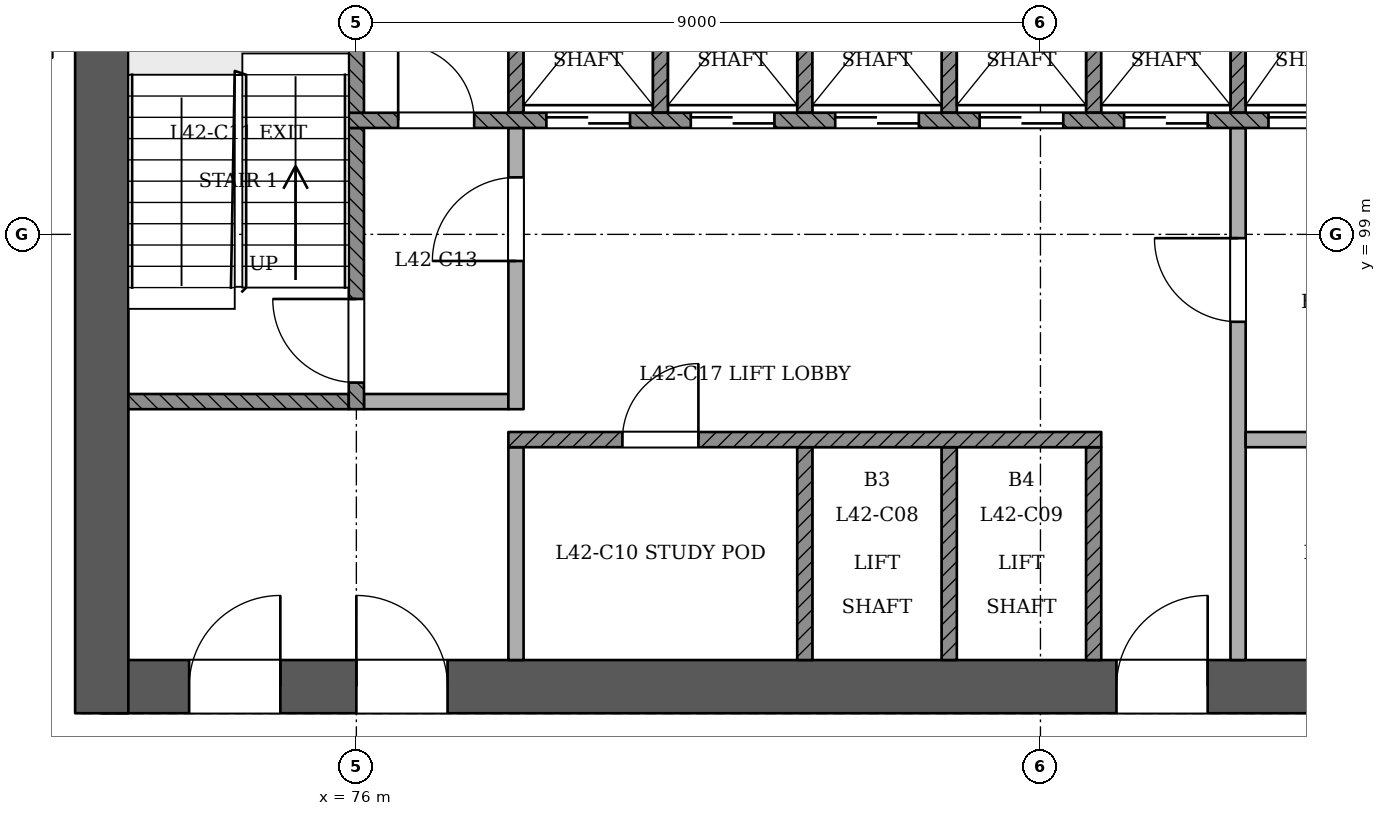
"""IFC4 building model, lengths in metres.
Left out: names, types, materials, properties, quantities, classifications, styles, units other than length and angle.
Written with IfcOpenShell. Run it as: python <this file> out.ifc"""

import sys

from ifc_helpers import new_model, si_unit, direction, frame, frame_2d, origin, place, context, subcontext, project, spatial, rectangle, extrude, element, fill, save


model = new_model("IFC4")
c1 = context("Model", 3, precision=1e-05, world=origin(), true_north=direction((0.0, 1.0)))
c2 = subcontext(c1, "Body", "Model", "MODEL_VIEW")
j1 = project(units=[si_unit("LENGTHUNIT", "METRE"), si_unit("PLANEANGLEUNIT", "RADIAN")], contexts=[c1])
p1 = place(None, origin())
s1 = spatial("IfcSite", under=j1, at=p1, CompositionType="ELEMENT")
p2 = place(p1, origin())
s2 = spatial("IfcBuilding", under=s1, at=p2, CompositionType="ELEMENT")
p3 = place(p2, frame((0.0, 0.0, 163.8)))
s3 = spatial("IfcBuildingStorey", under=s2, at=p3, CompositionType="ELEMENT", Elevation=163.8)
p4 = place(p3, frame((72.65, 93.05, 0.0), z_axis=(0.0, 0.0, 1.0), x_axis=(1.0, 0.0, 0.0)))
e1 = element("IfcWall", 1, at=p4, inside=s3, PredefinedType="SHEAR", context=c2, shape_type="SweptSolid", body=[
    extrude(rectangle(XDim=25.05, YDim=0.7, at=frame_2d((12.525, 0.0))), origin(), (0.0, 0.0, 1.0), 3.6),
])
p5 = place(p4, frame((1.15, 0.0, 0.0)))
e2 = element("IfcOpeningElement", 2, at=p5, cuts=e1, PredefinedType="OPENING", context=c2, shape_type="SweptSolid", body=[
    extrude(rectangle(XDim=1.2, YDim=2.1, at=frame_2d((0.6, 1.05))), frame((0.0, 0.36, 0.0), z_axis=(0.0, -1.0, 0.0), x_axis=(1.0, 0.0, 0.0)), (0.0, 0.0, 1.0), 0.721),
])
p6 = place(p4, frame((3.35, 0.0, 0.0)))
e3 = element("IfcOpeningElement", 3, at=p6, cuts=e1, PredefinedType="OPENING", context=c2, shape_type="SweptSolid", body=[
    extrude(rectangle(XDim=1.2, YDim=2.1, at=frame_2d((0.6, 1.05))), frame((0.0, 0.36, 0.0), z_axis=(0.0, -1.0, 0.0), x_axis=(1.0, 0.0, 0.0)), (0.0, 0.0, 1.0), 0.721),
])
p7 = place(p4, frame((13.35, 0.0, 0.0)))
e4 = element("IfcOpeningElement", 4, at=p7, cuts=e1, PredefinedType="OPENING", context=c2, shape_type="SweptSolid", body=[
    extrude(rectangle(XDim=1.2, YDim=2.1, at=frame_2d((0.6, 1.05))), frame((0.0, 0.36, 0.0), z_axis=(0.0, -1.0, 0.0), x_axis=(1.0, 0.0, 0.0)), (0.0, 0.0, 1.0), 0.721),
])
p8 = place(p4, frame((16.762, 0.0, 0.0)))
e5 = element("IfcOpeningElement", 5, at=p8, cuts=e1, PredefinedType="OPENING", context=c2, shape_type="SweptSolid", body=[
    extrude(rectangle(XDim=1.0, YDim=2.1, at=frame_2d((0.5, 1.05))), frame((0.0, 0.36, 0.0), z_axis=(0.0, -1.0, 0.0), x_axis=(1.0, 0.0, 0.0)), (0.0, 0.0, 1.0), 0.721),
])
p9 = place(p4, frame((20.65, 0.0, 0.0)))
e6 = element("IfcOpeningElement", 6, at=p9, cuts=e1, PredefinedType="OPENING", context=c2, shape_type="SweptSolid", body=[
    extrude(rectangle(XDim=1.0, YDim=2.1, at=frame_2d((0.5, 1.05))), frame((0.0, 0.36, 0.0), z_axis=(0.0, -1.0, 0.0), x_axis=(1.0, 0.0, 0.0)), (0.0, 0.0, 1.0), 0.721),
])
p10 = place(p4, frame((23.087, 0.0, 0.0)))
e7 = element("IfcOpeningElement", 7, at=p10, cuts=e1, PredefinedType="OPENING", context=c2, shape_type="SweptSolid", body=[
    extrude(rectangle(XDim=1.0, YDim=2.1, at=frame_2d((0.5, 1.05))), frame((0.0, 0.36, 0.0), z_axis=(0.0, -1.0, 0.0), x_axis=(1.0, 0.0, 0.0)), (0.0, 0.0, 1.0), 0.721),
])
p11 = place(p3, frame((72.65, 103.75, 0.0), z_axis=(0.0, 0.0, 1.0), x_axis=(0.0, -1.0, 0.0)))
e8 = element("IfcWall", 8, at=p11, inside=s3, PredefinedType="SHEAR", context=c2, shape_type="SweptSolid", body=[
    extrude(rectangle(XDim=11.05, YDim=0.7, at=frame_2d((5.525, 0.0))), origin(), (0.0, 0.0, 1.0), 3.6),
])
p12 = place(p3, frame((78.1, 93.4, 0.0), z_axis=(0.0, 0.0, 1.0), x_axis=(0.0, 1.0, 0.0)))
e9 = element("IfcWall", 9, at=p12, inside=s3, PredefinedType="PARTITIONING", context=c2, shape_type="SweptSolid", body=[
    extrude(rectangle(XDim=2.8, YDim=0.2, at=frame_2d((1.4, 0.0))), origin(), (0.0, 0.0, 1.0), 3.15),
])
for number, where, z_axis, x_axis in (
    (10, (81.9, 93.4, 0.0), (0.0, 0.0, 1.0), (0.0, 1.0, 0.0)),
    (11, (83.8, 93.4, 0.0), (0.0, 0.0, 1.0), (0.0, 1.0, 0.0)),
    (12, (85.7, 93.4, 0.0), (0.0, 0.0, 1.0), (0.0, 1.0, 0.0)),
):
    element("IfcWall", number, at=place(p3, frame(where, z_axis=z_axis, x_axis=x_axis)), inside=s3, PredefinedType="SOLIDWALL", context=c2, shape_type="SweptSolid", body=[
        extrude(rectangle(XDim=2.8, YDim=0.2, at=frame_2d((1.4, 0.0))), origin(), (0.0, 0.0, 1.0), 3.15),
    ])
p13 = place(p3, frame((87.6, 93.4, 0.0), z_axis=(0.0, 0.0, 1.0), x_axis=(0.0, 1.0, 0.0)))
e13 = element("IfcWall", 13, at=p13, inside=s3, PredefinedType="PARTITIONING", context=c2, shape_type="SweptSolid", body=[
    extrude(rectangle(XDim=7.0, YDim=0.2, at=frame_2d((3.5, 0.0))), origin(), (0.0, 0.0, 1.0), 3.15),
])
p14 = place(p13, frame((4.45, 0.0, 0.0)))
e14 = element("IfcOpeningElement", 14, at=p14, cuts=e13, PredefinedType="OPENING", context=c2, shape_type="SweptSolid", body=[
    extrude(rectangle(XDim=1.1, YDim=2.1, at=frame_2d((0.55, 1.05))), frame((0.0, 0.11, 0.0), z_axis=(0.0, -1.0, 0.0), x_axis=(1.0, 0.0, 0.0)), (0.0, 0.0, 1.0), 0.221),
])
p15 = place(p3, frame((78.0, 96.3, 0.0), z_axis=(0.0, 0.0, 1.0), x_axis=(1.0, 0.0, 0.0)))
e15 = element("IfcWall", 15, at=p15, inside=s3, PredefinedType="SOLIDWALL", context=c2, shape_type="SweptSolid", body=[
    extrude(rectangle(XDim=7.8, YDim=0.2, at=frame_2d((3.9, 0.0))), origin(), (0.0, 0.0, 1.0), 3.15),
])
p16 = place(p15, frame((1.5, 0.0, 0.0)))
e16 = element("IfcOpeningElement", 16, at=p16, cuts=e15, PredefinedType="OPENING", context=c2, shape_type="SweptSolid", body=[
    extrude(rectangle(XDim=1.0, YDim=2.1, at=frame_2d((0.5, 1.05))), frame((0.0, 0.11, 0.0), z_axis=(0.0, -1.0, 0.0), x_axis=(1.0, 0.0, 0.0)), (0.0, 0.0, 1.0), 0.221),
])
p17 = place(p3, frame((87.7, 96.3, 0.0), z_axis=(0.0, 0.0, 1.0), x_axis=(1.0, 0.0, 0.0)))
e17 = element("IfcWall", 17, at=p17, inside=s3, PredefinedType="PARTITIONING", context=c2, shape_type="SweptSolid", body=[
    extrude(rectangle(XDim=3.6, YDim=0.2, at=frame_2d((1.8, 0.0))), origin(), (0.0, 0.0, 1.0), 3.15),
])
p18 = place(p3, frame((73.0, 96.8, 0.0), z_axis=(0.0, 0.0, 1.0), x_axis=(1.0, 0.0, 0.0)))
e18 = element("IfcWall", 18, at=p18, inside=s3, PredefinedType="SOLIDWALL", context=c2, shape_type="SweptSolid", body=[
    extrude(rectangle(XDim=2.9, YDim=0.2, at=frame_2d((1.45, 0.0))), origin(), (0.0, 0.0, 1.0), 3.15),
])
p19 = place(p3, frame((76.0, 96.7, 0.0), z_axis=(0.0, 0.0, 1.0), x_axis=(0.0, 1.0, 0.0)))
e19 = element("IfcWall", 19, at=p19, inside=s3, PredefinedType="SOLIDWALL", context=c2, shape_type="SweptSolid", body=[
    extrude(rectangle(XDim=3.7, YDim=0.2, at=frame_2d((1.85, 0.0))), origin(), (0.0, 0.0, 1.0), 3.15),
])
p20 = place(p19, frame((0.35, 0.0, 0.0)))
e20 = element("IfcOpeningElement", 20, at=p20, cuts=e19, PredefinedType="OPENING", context=c2, shape_type="SweptSolid", body=[
    extrude(rectangle(XDim=1.1, YDim=2.1, at=frame_2d((0.55, 1.05))), frame((0.0, 0.11, 0.0), z_axis=(0.0, -1.0, 0.0), x_axis=(1.0, 0.0, 0.0)), (0.0, 0.0, 1.0), 0.221),
])
p21 = place(p3, frame((76.1, 96.8, 0.0), z_axis=(0.0, 0.0, 1.0), x_axis=(1.0, 0.0, 0.0)))
e21 = element("IfcWall", 21, at=p21, inside=s3, PredefinedType="PARTITIONING", context=c2, shape_type="SweptSolid", body=[
    extrude(rectangle(XDim=1.9, YDim=0.2, at=frame_2d((0.95, 0.0))), origin(), (0.0, 0.0, 1.0), 3.15),
])
p22 = place(p3, frame((78.1, 96.7, 0.0), z_axis=(0.0, 0.0, 1.0), x_axis=(0.0, 1.0, 0.0)))
e22 = element("IfcWall", 22, at=p22, inside=s3, PredefinedType="PARTITIONING", context=c2, shape_type="SweptSolid", body=[
    extrude(rectangle(XDim=3.7, YDim=0.2, at=frame_2d((1.85, 0.0))), origin(), (0.0, 0.0, 1.0), 3.15),
])
p23 = place(p22, frame((1.95, 0.0, 0.0)))
e23 = element("IfcOpeningElement", 23, at=p23, cuts=e22, PredefinedType="OPENING", context=c2, shape_type="SweptSolid", body=[
    extrude(rectangle(XDim=1.1, YDim=2.1, at=frame_2d((0.55, 1.05))), frame((0.0, 0.11, 0.0), z_axis=(0.0, -1.0, 0.0), x_axis=(1.0, 0.0, 0.0)), (0.0, 0.0, 1.0), 0.221),
])
p24 = place(p3, frame((75.9, 100.5, 0.0), z_axis=(0.0, 0.0, 1.0), x_axis=(1.0, 0.0, 0.0)))
e24 = element("IfcWall", 24, at=p24, inside=s3, PredefinedType="SOLIDWALL", context=c2, shape_type="SweptSolid", body=[
    extrude(rectangle(XDim=18.2, YDim=0.2, at=frame_2d((9.1, 0.0))), origin(), (0.0, 0.0, 1.0), 3.15),
])
p25 = place(p24, frame((2.6, 0.0, 0.0)))
e25 = element("IfcOpeningElement", 25, at=p25, cuts=e24, PredefinedType="OPENING", context=c2, shape_type="SweptSolid", body=[
    extrude(rectangle(XDim=1.1, YDim=2.1, at=frame_2d((0.55, 1.05))), frame((0.0, 0.11, 0.0), z_axis=(0.0, -1.0, 0.0), x_axis=(1.0, 0.0, 0.0)), (0.0, 0.0, 1.0), 0.221),
])
p26 = place(p24, frame((4.5, 0.0, 0.0)))
e26 = element("IfcOpeningElement", 26, at=p26, cuts=e24, PredefinedType="OPENING", context=c2, shape_type="SweptSolid", body=[
    extrude(rectangle(XDim=1.1, YDim=2.1, at=frame_2d((0.55, 1.05))), frame((0.0, 0.11, 0.0), z_axis=(0.0, -1.0, 0.0), x_axis=(1.0, 0.0, 0.0)), (0.0, 0.0, 1.0), 0.221),
])
p27 = place(p24, frame((6.4, 0.0, 0.0)))
e27 = element("IfcOpeningElement", 27, at=p27, cuts=e24, PredefinedType="OPENING", context=c2, shape_type="SweptSolid", body=[
    extrude(rectangle(XDim=1.1, YDim=2.1, at=frame_2d((0.55, 1.05))), frame((0.0, 0.11, 0.0), z_axis=(0.0, -1.0, 0.0), x_axis=(1.0, 0.0, 0.0)), (0.0, 0.0, 1.0), 0.221),
])
p28 = place(p24, frame((8.3, 0.0, 0.0)))
e28 = element("IfcOpeningElement", 28, at=p28, cuts=e24, PredefinedType="OPENING", context=c2, shape_type="SweptSolid", body=[
    extrude(rectangle(XDim=1.1, YDim=2.1, at=frame_2d((0.55, 1.05))), frame((0.0, 0.11, 0.0), z_axis=(0.0, -1.0, 0.0), x_axis=(1.0, 0.0, 0.0)), (0.0, 0.0, 1.0), 0.221),
])
p29 = place(p24, frame((10.2, 0.0, 0.0)))
e29 = element("IfcOpeningElement", 29, at=p29, cuts=e24, PredefinedType="OPENING", context=c2, shape_type="SweptSolid", body=[
    extrude(rectangle(XDim=1.1, YDim=2.1, at=frame_2d((0.55, 1.05))), frame((0.0, 0.11, 0.0), z_axis=(0.0, -1.0, 0.0), x_axis=(1.0, 0.0, 0.0)), (0.0, 0.0, 1.0), 0.221),
])
p30 = place(p24, frame((12.1, 0.0, 0.0)))
e30 = element("IfcOpeningElement", 30, at=p30, cuts=e24, PredefinedType="OPENING", context=c2, shape_type="SweptSolid", body=[
    extrude(rectangle(XDim=1.1, YDim=2.1, at=frame_2d((0.55, 1.05))), frame((0.0, 0.11, 0.0), z_axis=(0.0, -1.0, 0.0), x_axis=(1.0, 0.0, 0.0)), (0.0, 0.0, 1.0), 0.221),
])
p31 = place(p24, frame((14.0, 0.0, 0.0)))
e31 = element("IfcOpeningElement", 31, at=p31, cuts=e24, PredefinedType="OPENING", context=c2, shape_type="SweptSolid", body=[
    extrude(rectangle(XDim=1.1, YDim=2.1, at=frame_2d((0.55, 1.05))), frame((0.0, 0.11, 0.0), z_axis=(0.0, -1.0, 0.0), x_axis=(1.0, 0.0, 0.0)), (0.0, 0.0, 1.0), 0.221),
])
p32 = place(p24, frame((0.65, 0.0, 0.0)))
e32 = element("IfcOpeningElement", 32, at=p32, cuts=e24, PredefinedType="OPENING", context=c2, shape_type="SweptSolid", body=[
    extrude(rectangle(XDim=1.0, YDim=2.1, at=frame_2d((0.5, 1.05))), frame((0.0, 0.11, 0.0), z_axis=(0.0, -1.0, 0.0), x_axis=(1.0, 0.0, 0.0)), (0.0, 0.0, 1.0), 0.221),
])
p33 = place(p24, frame((16.3, 0.0, 0.0)))
e33 = element("IfcOpeningElement", 33, at=p33, cuts=e24, PredefinedType="OPENING", context=c2, shape_type="SweptSolid", body=[
    extrude(rectangle(XDim=1.0, YDim=2.1, at=frame_2d((0.5, 1.05))), frame((0.0, 0.11, 0.0), z_axis=(0.0, -1.0, 0.0), x_axis=(1.0, 0.0, 0.0)), (0.0, 0.0, 1.0), 0.221),
])
for number, where, z_axis, x_axis in (
    (34, (76.0, 100.6, 0.0), (0.0, 0.0, 1.0), (0.0, 1.0, 0.0)),
    (35, (78.1, 100.6, 0.0), (0.0, 0.0, 1.0), (0.0, 1.0, 0.0)),
    (36, (80.0, 100.6, 0.0), (0.0, 0.0, 1.0), (0.0, 1.0, 0.0)),
    (37, (81.9, 100.6, 0.0), (0.0, 0.0, 1.0), (0.0, 1.0, 0.0)),
    (38, (83.8, 100.6, 0.0), (0.0, 0.0, 1.0), (0.0, 1.0, 0.0)),
    (39, (85.7, 100.6, 0.0), (0.0, 0.0, 1.0), (0.0, 1.0, 0.0)),
    (40, (87.6, 100.6, 0.0), (0.0, 0.0, 1.0), (0.0, 1.0, 0.0)),
):
    element("IfcWall", number, at=place(p3, frame(where, z_axis=z_axis, x_axis=x_axis)), inside=s3, PredefinedType="SOLIDWALL", context=c2, shape_type="SweptSolid", body=[
        extrude(rectangle(XDim=2.8, YDim=0.2, at=frame_2d((1.4, 0.0))), origin(), (0.0, 0.0, 1.0), 3.15),
    ])
p34 = place(p25, origin())
e41 = element("IfcDoor", 41, at=p34, inside=s3, OperationType="SLIDING_TO_RIGHT", PredefinedType="NOTDEFINED", context=c2, shape_type="SweptSolid", body=[
    extrude(rectangle(XDim=1.1, YDim=2.1, at=frame_2d((0.55, 1.05))), frame((0.0, 0.025, 0.0), z_axis=(0.0, -1.0, 0.0), x_axis=(1.0, 0.0, 0.0)), (0.0, 0.0, 1.0), 0.05),
])
fill(e25, e41)
p35 = place(p26, origin())
e42 = element("IfcDoor", 42, at=p35, inside=s3, OperationType="SLIDING_TO_LEFT", PredefinedType="NOTDEFINED", context=c2, shape_type="SweptSolid", body=[
    extrude(rectangle(XDim=1.1, YDim=2.1, at=frame_2d((0.55, 1.05))), frame((0.0, 0.025, 0.0), z_axis=(0.0, -1.0, 0.0), x_axis=(1.0, 0.0, 0.0)), (0.0, 0.0, 1.0), 0.05),
])
fill(e26, e42)
p36 = place(p27, origin())
e43 = element("IfcDoor", 43, at=p36, inside=s3, OperationType="SLIDING_TO_RIGHT", PredefinedType="NOTDEFINED", context=c2, shape_type="SweptSolid", body=[
    extrude(rectangle(XDim=1.1, YDim=2.1, at=frame_2d((0.55, 1.05))), frame((0.0, 0.025, 0.0), z_axis=(0.0, -1.0, 0.0), x_axis=(1.0, 0.0, 0.0)), (0.0, 0.0, 1.0), 0.05),
])
fill(e27, e43)
p37 = place(p28, origin())
e44 = element("IfcDoor", 44, at=p37, inside=s3, OperationType="SLIDING_TO_LEFT", PredefinedType="NOTDEFINED", context=c2, shape_type="SweptSolid", body=[
    extrude(rectangle(XDim=1.1, YDim=2.1, at=frame_2d((0.55, 1.05))), frame((0.0, 0.025, 0.0), z_axis=(0.0, -1.0, 0.0), x_axis=(1.0, 0.0, 0.0)), (0.0, 0.0, 1.0), 0.05),
])
fill(e28, e44)
p38 = place(p29, origin())
e45 = element("IfcDoor", 45, at=p38, inside=s3, OperationType="SLIDING_TO_RIGHT", PredefinedType="NOTDEFINED", context=c2, shape_type="SweptSolid", body=[
    extrude(rectangle(XDim=1.1, YDim=2.1, at=frame_2d((0.55, 1.05))), frame((0.0, 0.025, 0.0), z_axis=(0.0, -1.0, 0.0), x_axis=(1.0, 0.0, 0.0)), (0.0, 0.0, 1.0), 0.05),
])
fill(e29, e45)
p39 = place(p30, origin())
e46 = element("IfcDoor", 46, at=p39, inside=s3, OperationType="SLIDING_TO_RIGHT", PredefinedType="NOTDEFINED", context=c2, shape_type="SweptSolid", body=[
    extrude(rectangle(XDim=1.1, YDim=2.1, at=frame_2d((0.55, 1.05))), frame((0.0, 0.025, 0.0), z_axis=(0.0, -1.0, 0.0), x_axis=(1.0, 0.0, 0.0)), (0.0, 0.0, 1.0), 0.05),
])
fill(e30, e46)
p40 = place(p20, origin())
e47 = element("IfcDoor", 47, at=p40, inside=s3, OperationType="SINGLE_SWING_RIGHT", PredefinedType="NOTDEFINED", context=c2, shape_type="SweptSolid", body=[
    extrude(rectangle(XDim=1.1, YDim=2.1, at=frame_2d((0.55, 1.05))), frame((0.0, 0.025, 0.0), z_axis=(0.0, -1.0, 0.0), x_axis=(1.0, 0.0, 0.0)), (0.0, 0.0, 1.0), 0.05),
])
fill(e20, e47)
p41 = place(p23, origin())
e48 = element("IfcDoor", 48, at=p41, inside=s3, OperationType="SINGLE_SWING_LEFT", PredefinedType="NOTDEFINED", context=c2, shape_type="SweptSolid", body=[
    extrude(rectangle(XDim=1.1, YDim=2.1, at=frame_2d((0.55, 1.05))), frame((0.0, 0.025, 0.0), z_axis=(0.0, -1.0, 0.0), x_axis=(1.0, 0.0, 0.0)), (0.0, 0.0, 1.0), 0.05),
])
fill(e23, e48)
p42 = place(p14, origin())
e49 = element("IfcDoor", 49, at=p42, inside=s3, OperationType="SINGLE_SWING_RIGHT", PredefinedType="NOTDEFINED", context=c2, shape_type="SweptSolid", body=[
    extrude(rectangle(XDim=1.1, YDim=2.1, at=frame_2d((0.55, 1.05))), frame((0.0, 0.025, 0.0), z_axis=(0.0, -1.0, 0.0), x_axis=(1.0, 0.0, 0.0)), (0.0, 0.0, 1.0), 0.05),
])
fill(e14, e49)
p43 = place(p5, origin())
e50 = element("IfcDoor", 50, at=p43, inside=s3, OperationType="SINGLE_SWING_RIGHT", PredefinedType="NOTDEFINED", context=c2, shape_type="SweptSolid", body=[
    extrude(rectangle(XDim=1.2, YDim=2.1, at=frame_2d((0.6, 1.05))), frame((0.0, 0.025, 0.0), z_axis=(0.0, -1.0, 0.0), x_axis=(1.0, 0.0, 0.0)), (0.0, 0.0, 1.0), 0.05),
])
fill(e2, e50)
p44 = place(p6, origin())
e51 = element("IfcDoor", 51, at=p44, inside=s3, OperationType="SINGLE_SWING_LEFT", PredefinedType="NOTDEFINED", context=c2, shape_type="SweptSolid", body=[
    extrude(rectangle(XDim=1.2, YDim=2.1, at=frame_2d((0.6, 1.05))), frame((0.0, 0.025, 0.0), z_axis=(0.0, -1.0, 0.0), x_axis=(1.0, 0.0, 0.0)), (0.0, 0.0, 1.0), 0.05),
])
fill(e3, e51)
p45 = place(p7, origin())
e52 = element("IfcDoor", 52, at=p45, inside=s3, OperationType="SINGLE_SWING_RIGHT", PredefinedType="NOTDEFINED", context=c2, shape_type="SweptSolid", body=[
    extrude(rectangle(XDim=1.2, YDim=2.1, at=frame_2d((0.6, 1.05))), frame((0.0, 0.025, 0.0), z_axis=(0.0, -1.0, 0.0), x_axis=(1.0, 0.0, 0.0)), (0.0, 0.0, 1.0), 0.05),
])
fill(e4, e52)
p46 = place(p32, origin())
e53 = element("IfcDoor", 53, at=p46, inside=s3, OperationType="SINGLE_SWING_LEFT", PredefinedType="NOTDEFINED", context=c2, shape_type="SweptSolid", body=[
    extrude(rectangle(XDim=1.0, YDim=2.1, at=frame_2d((0.5, 1.05))), frame((0.0, 0.025, 0.0), z_axis=(0.0, -1.0, 0.0), x_axis=(1.0, 0.0, 0.0)), (0.0, 0.0, 1.0), 0.05),
])
fill(e32, e53)
p47 = place(p16, origin())
e54 = element("IfcDoor", 54, at=p47, inside=s3, OperationType="SINGLE_SWING_RIGHT", PredefinedType="NOTDEFINED", context=c2, shape_type="SweptSolid", body=[
    extrude(rectangle(XDim=1.0, YDim=2.1, at=frame_2d((0.5, 1.05))), frame((0.0, 0.025, 0.0), z_axis=(0.0, -1.0, 0.0), x_axis=(1.0, 0.0, 0.0)), (0.0, 0.0, 1.0), 0.05),
])
fill(e16, e54)
save(model, sys.argv[1])
